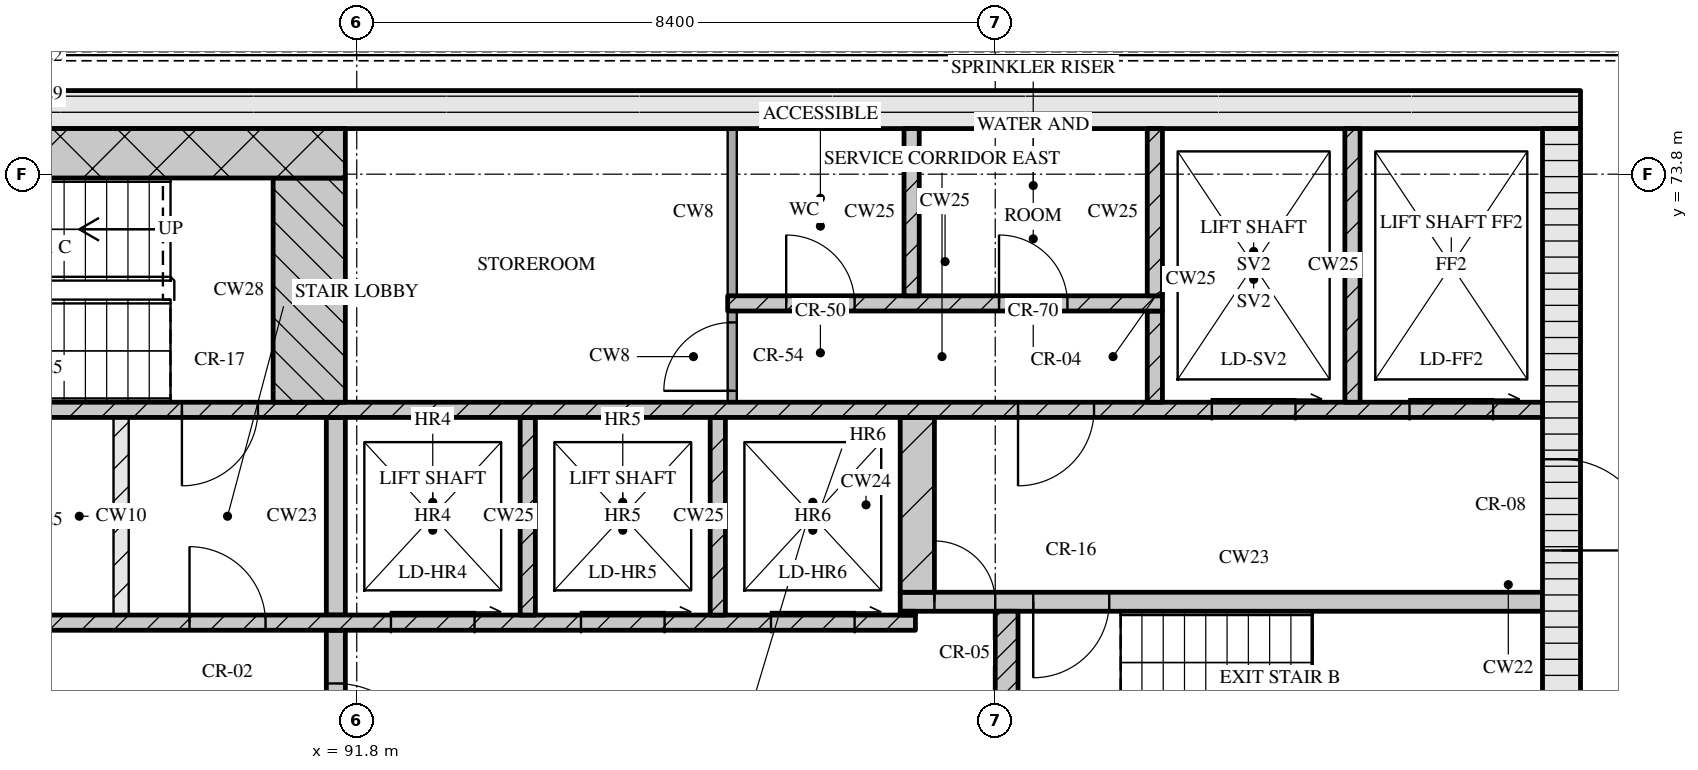
"""IFC4 building model, lengths in metres.
Left out: names, types, materials, properties, quantities, classifications, styles, units other than length and angle.
Written with IfcOpenShell. Run it as: python <this file> out.ifc"""

import sys

from ifc_helpers import new_model, si_unit, direction, frame, frame_2d, origin, place, context, subcontext, project, spatial, rectangle, extrude, element, fill, save


model = new_model("IFC4")
c1 = context("Model", 3, precision=1e-05, world=origin(), true_north=direction((0.0, 1.0)))
c2 = subcontext(c1, "Body", "Model", "MODEL_VIEW")
j1 = project(units=[si_unit("LENGTHUNIT", "METRE"), si_unit("PLANEANGLEUNIT", "RADIAN")], contexts=[c1])
p1 = place(None, origin())
s1 = spatial("IfcSite", under=j1, at=p1, CompositionType="ELEMENT")
p2 = place(p1, origin())
s2 = spatial("IfcBuilding", under=s1, at=p2, CompositionType="ELEMENT")
p3 = place(p2, frame((0.0, 0.0, 292.35)))
s3 = spatial("IfcBuildingStorey", under=s2, at=p3, CompositionType="ELEMENT", Elevation=292.35)
p4 = place(p3, frame((67.3, 74.65, 0.0), z_axis=(0.0, 0.0, 1.0), x_axis=(1.0, 0.0, 0.0)))
e1 = element("IfcWall", 1, at=p4, inside=s3, PredefinedType="SOLIDWALL", context=c2, shape_type="SweptSolid", body=[
    extrude(rectangle(XDim=40.6, YDim=0.5, at=frame_2d((20.3, 0.0))), origin(), (0.0, 0.0, 1.0), 3.32),
])
p5 = place(p3, frame((107.65, 62.4, 0.0), z_axis=(0.0, 0.0, 1.0), x_axis=(0.0, 1.0, 0.0)))
e2 = element("IfcWall", 2, at=p5, inside=s3, PredefinedType="SOLIDWALL", context=c2, shape_type="SweptSolid", body=[
    extrude(rectangle(XDim=12.0, YDim=0.5, at=frame_2d((6.0, 0.0))), origin(), (0.0, 0.0, 1.0), 3.32),
])
p6 = place(p5, frame((6.45, 0.0, 0.0)))
e3 = element("IfcOpeningElement", 3, at=p6, cuts=e2, PredefinedType="OPENING", context=c2, shape_type="SweptSolid", body=[
    extrude(rectangle(XDim=1.2, YDim=2.1, at=frame_2d((0.6, 1.05))), frame((0.0, 0.26, 0.0), z_axis=(0.0, -1.0, 0.0), x_axis=(1.0, 0.0, 0.0)), (0.0, 0.0, 1.0), 0.52),
])
p7 = place(p3, frame((91.525, 65.2, 0.0), z_axis=(0.0, 0.0, 1.0), x_axis=(0.0, 1.0, 0.0)))
e4 = element("IfcWall", 4, at=p7, inside=s3, PredefinedType="SOLIDWALL", context=c2, shape_type="SweptSolid", body=[
    extrude(rectangle(XDim=2.6, YDim=0.25, at=frame_2d((1.3, 0.0))), origin(), (0.0, 0.0, 1.0), 3.32),
])
p8 = place(p7, frame((0.7, 0.0, 0.0)))
e5 = element("IfcOpeningElement", 5, at=p8, cuts=e4, PredefinedType="OPENING", context=c2, shape_type="SweptSolid", body=[
    extrude(rectangle(XDim=1.2, YDim=2.1, at=frame_2d((0.6, 1.05))), frame((0.0, 0.135, 0.0), z_axis=(0.0, -1.0, 0.0), x_axis=(1.0, 0.0, 0.0)), (0.0, 0.0, 1.0), 0.27),
])
p9 = place(p3, frame((100.35, 65.2, 0.0), z_axis=(0.0, 0.0, 1.0), x_axis=(0.0, 1.0, 0.0)))
e6 = element("IfcWall", 6, at=p9, inside=s3, PredefinedType="SOLIDWALL", context=c2, shape_type="SweptSolid", body=[
    extrude(rectangle(XDim=2.85, YDim=0.3, at=frame_2d((1.425, 0.0))), origin(), (0.0, 0.0, 1.0), 3.32),
])
p10 = place(p3, frame((76.05, 67.9, 0.0), z_axis=(0.0, 0.0, 1.0), x_axis=(1.0, 0.0, 0.0)))
e7 = element("IfcWall", 7, at=p10, inside=s3, PredefinedType="SOLIDWALL", context=c2, shape_type="SweptSolid", body=[
    extrude(rectangle(XDim=23.1, YDim=0.2, at=frame_2d((11.55, 0.0))), origin(), (0.0, 0.0, 1.0), 3.32),
])
p11 = place(p10, frame((1.95, 0.0, 0.0)))
e8 = element("IfcOpeningElement", 8, at=p11, cuts=e7, PredefinedType="OPENING", context=c2, shape_type="SweptSolid", body=[
    extrude(rectangle(XDim=0.9, YDim=2.1, at=frame_2d((0.45, 1.05))), frame((0.0, 0.11, 0.0), z_axis=(0.0, -1.0, 0.0), x_axis=(1.0, 0.0, 0.0)), (0.0, 0.0, 1.0), 0.22),
])
p12 = place(p10, frame((5.66, 0.0, 0.0)))
e9 = element("IfcOpeningElement", 9, at=p12, cuts=e7, PredefinedType="OPENING", context=c2, shape_type="SweptSolid", body=[
    extrude(rectangle(XDim=0.9, YDim=2.1, at=frame_2d((0.45, 1.05))), frame((0.0, 0.11, 0.0), z_axis=(0.0, -1.0, 0.0), x_axis=(1.0, 0.0, 0.0)), (0.0, 0.0, 1.0), 0.22),
])
p13 = place(p10, frame((9.7, 0.0, 0.0)))
e10 = element("IfcOpeningElement", 10, at=p13, cuts=e7, PredefinedType="OPENING", context=c2, shape_type="SweptSolid", body=[
    extrude(rectangle(XDim=0.9, YDim=2.1, at=frame_2d((0.45, 1.05))), frame((0.0, 0.11, 0.0), z_axis=(0.0, -1.0, 0.0), x_axis=(1.0, 0.0, 0.0)), (0.0, 0.0, 1.0), 0.22),
])
p14 = place(p10, frame((13.55, 0.0, 0.0)))
e11 = element("IfcOpeningElement", 11, at=p14, cuts=e7, PredefinedType="OPENING", context=c2, shape_type="SweptSolid", body=[
    extrude(rectangle(XDim=1.0, YDim=2.1, at=frame_2d((0.5, 1.05))), frame((0.0, 0.11, 0.0), z_axis=(0.0, -1.0, 0.0), x_axis=(1.0, 0.0, 0.0)), (0.0, 0.0, 1.0), 0.22),
])
p15 = place(p10, frame((16.2, 0.0, 0.0)))
e12 = element("IfcOpeningElement", 12, at=p15, cuts=e7, PredefinedType="OPENING", context=c2, shape_type="SweptSolid", body=[
    extrude(rectangle(XDim=1.1, YDim=2.1, at=frame_2d((0.55, 1.05))), frame((0.0, 0.11, 0.0), z_axis=(0.0, -1.0, 0.0), x_axis=(1.0, 0.0, 0.0)), (0.0, 0.0, 1.0), 0.22),
])
p16 = place(p10, frame((18.7, 0.0, 0.0)))
e13 = element("IfcOpeningElement", 13, at=p16, cuts=e7, PredefinedType="OPENING", context=c2, shape_type="SweptSolid", body=[
    extrude(rectangle(XDim=1.1, YDim=2.1, at=frame_2d((0.55, 1.05))), frame((0.0, 0.11, 0.0), z_axis=(0.0, -1.0, 0.0), x_axis=(1.0, 0.0, 0.0)), (0.0, 0.0, 1.0), 0.22),
])
p17 = place(p10, frame((21.2, 0.0, 0.0)))
e14 = element("IfcOpeningElement", 14, at=p17, cuts=e7, PredefinedType="OPENING", context=c2, shape_type="SweptSolid", body=[
    extrude(rectangle(XDim=1.1, YDim=2.1, at=frame_2d((0.55, 1.05))), frame((0.0, 0.11, 0.0), z_axis=(0.0, -1.0, 0.0), x_axis=(1.0, 0.0, 0.0)), (0.0, 0.0, 1.0), 0.22),
])
p18 = place(p3, frame((88.7, 68.0, 0.0), z_axis=(0.0, 0.0, 1.0), x_axis=(0.0, 1.0, 0.0)))
e15 = element("IfcWall", 15, at=p18, inside=s3, PredefinedType="PARTITIONING", context=c2, shape_type="SweptSolid", body=[
    extrude(rectangle(XDim=2.6, YDim=0.2, at=frame_2d((1.3, 0.0))), origin(), (0.0, 0.0, 1.0), 3.32),
])
p19 = place(p3, frame((91.525, 68.0, 0.0), z_axis=(0.0, 0.0, 1.0), x_axis=(0.0, 1.0, 0.0)))
e16 = element("IfcWall", 16, at=p19, inside=s3, PredefinedType="SOLIDWALL", context=c2, shape_type="SweptSolid", body=[
    extrude(rectangle(XDim=2.6, YDim=0.25, at=frame_2d((1.3, 0.0))), origin(), (0.0, 0.0, 1.0), 3.32),
])
for number, where, z_axis, x_axis in (
    (17, (94.05, 68.0, 0.0), (0.0, 0.0, 1.0), (0.0, 1.0, 0.0)),
    (18, (96.55, 68.0, 0.0), (0.0, 0.0, 1.0), (0.0, 1.0, 0.0)),
):
    element("IfcWall", number, at=place(p3, frame(where, z_axis=z_axis, x_axis=x_axis)), inside=s3, PredefinedType="SOLIDWALL", context=c2, shape_type="SweptSolid", body=[
        extrude(rectangle(XDim=2.6, YDim=0.2, at=frame_2d((1.3, 0.0))), origin(), (0.0, 0.0, 1.0), 3.32),
    ])
p20 = place(p3, frame((98.95, 68.025, 0.0), z_axis=(0.0, 0.0, 1.0), x_axis=(1.0, 0.0, 0.0)))
e19 = element("IfcWall", 19, at=p20, inside=s3, PredefinedType="SOLIDWALL", context=c2, shape_type="SweptSolid", body=[
    extrude(rectangle(XDim=0.2, YDim=0.05, at=frame_2d((0.1, 0.0))), origin(), (0.0, 0.0, 1.0), 3.32),
])
p21 = place(p3, frame((98.95, 68.175, 0.0), z_axis=(0.0, 0.0, 1.0), x_axis=(1.0, 0.0, 0.0)))
e20 = element("IfcWall", 20, at=p21, inside=s3, PredefinedType="SOLIDWALL", context=c2, shape_type="SweptSolid", body=[
    extrude(rectangle(XDim=8.45, YDim=0.25, at=frame_2d((4.225, 0.0))), origin(), (0.0, 0.0, 1.0), 3.32),
])
p22 = place(p21, frame((0.45, 0.0, 0.0)))
e21 = element("IfcOpeningElement", 21, at=p22, cuts=e20, PredefinedType="OPENING", context=c2, shape_type="SweptSolid", body=[
    extrude(rectangle(XDim=0.8, YDim=2.1, at=frame_2d((0.4, 1.05))), frame((0.0, 0.135, 0.0), z_axis=(0.0, -1.0, 0.0), x_axis=(1.0, 0.0, 0.0)), (0.0, 0.0, 1.0), 0.27),
])
p23 = place(p21, frame((1.75, 0.0, 0.0)))
e22 = element("IfcOpeningElement", 22, at=p23, cuts=e20, PredefinedType="OPENING", context=c2, shape_type="SweptSolid", body=[
    extrude(rectangle(XDim=1.0, YDim=2.1, at=frame_2d((0.5, 1.05))), frame((0.0, 0.135, 0.0), z_axis=(0.0, -1.0, 0.0), x_axis=(1.0, 0.0, 0.0)), (0.0, 0.0, 1.0), 0.27),
])
p24 = place(p3, frame((99.175, 68.3, 0.0), z_axis=(0.0, 0.0, 1.0), x_axis=(0.0, 1.0, 0.0)))
e23 = element("IfcWall", 23, at=p24, inside=s3, PredefinedType="SOLIDWALL", context=c2, shape_type="SweptSolid", body=[
    extrude(rectangle(XDim=2.3, YDim=0.45, at=frame_2d((1.15, 0.0))), origin(), (0.0, 0.0, 1.0), 3.32),
])
p25 = place(p3, frame((67.8, 70.7, 0.0), z_axis=(0.0, 0.0, 1.0), x_axis=(1.0, 0.0, 0.0)))
e24 = element("IfcWall", 24, at=p25, inside=s3, PredefinedType="SOLIDWALL", context=c2, shape_type="SweptSolid", body=[
    extrude(rectangle(XDim=39.6, YDim=0.2, at=frame_2d((19.8, 0.0))), origin(), (0.0, 0.0, 1.0), 3.32),
])
p26 = place(p25, frame((0.65, 0.0, 0.0)))
e25 = element("IfcOpeningElement", 25, at=p26, cuts=e24, PredefinedType="OPENING", context=c2, shape_type="SweptSolid", body=[
    extrude(rectangle(XDim=1.1, YDim=2.1, at=frame_2d((0.55, 1.05))), frame((0.0, 0.11, 0.0), z_axis=(0.0, -1.0, 0.0), x_axis=(1.0, 0.0, 0.0)), (0.0, 0.0, 1.0), 0.22),
])
p27 = place(p25, frame((3.25, 0.0, 0.0)))
e26 = element("IfcOpeningElement", 26, at=p27, cuts=e24, PredefinedType="OPENING", context=c2, shape_type="SweptSolid", body=[
    extrude(rectangle(XDim=1.1, YDim=2.1, at=frame_2d((0.55, 1.05))), frame((0.0, 0.11, 0.0), z_axis=(0.0, -1.0, 0.0), x_axis=(1.0, 0.0, 0.0)), (0.0, 0.0, 1.0), 0.22),
])
p28 = place(p25, frame((5.9, 0.0, 0.0)))
e27 = element("IfcOpeningElement", 27, at=p28, cuts=e24, PredefinedType="OPENING", context=c2, shape_type="SweptSolid", body=[
    extrude(rectangle(XDim=1.0, YDim=2.1, at=frame_2d((0.5, 1.05))), frame((0.0, 0.11, 0.0), z_axis=(0.0, -1.0, 0.0), x_axis=(1.0, 0.0, 0.0)), (0.0, 0.0, 1.0), 0.22),
])
p29 = place(p25, frame((21.7, 0.0, 0.0)))
e28 = element("IfcOpeningElement", 28, at=p29, cuts=e24, PredefinedType="OPENING", context=c2, shape_type="SweptSolid", body=[
    extrude(rectangle(XDim=1.0, YDim=2.1, at=frame_2d((0.5, 1.05))), frame((0.0, 0.11, 0.0), z_axis=(0.0, -1.0, 0.0), x_axis=(1.0, 0.0, 0.0)), (0.0, 0.0, 1.0), 0.22),
])
p30 = place(p25, frame((32.7, 0.0, 0.0)))
e29 = element("IfcOpeningElement", 29, at=p30, cuts=e24, PredefinedType="OPENING", context=c2, shape_type="SweptSolid", body=[
    extrude(rectangle(XDim=1.0, YDim=2.1, at=frame_2d((0.5, 1.05))), frame((0.0, 0.11, 0.0), z_axis=(0.0, -1.0, 0.0), x_axis=(1.0, 0.0, 0.0)), (0.0, 0.0, 1.0), 0.22),
])
p31 = place(p25, frame((35.25, 0.0, 0.0)))
e30 = element("IfcOpeningElement", 30, at=p31, cuts=e24, PredefinedType="OPENING", context=c2, shape_type="SweptSolid", body=[
    extrude(rectangle(XDim=1.1, YDim=2.1, at=frame_2d((0.55, 1.05))), frame((0.0, 0.11, 0.0), z_axis=(0.0, -1.0, 0.0), x_axis=(1.0, 0.0, 0.0)), (0.0, 0.0, 1.0), 0.22),
])
p32 = place(p25, frame((37.85, 0.0, 0.0)))
e31 = element("IfcOpeningElement", 31, at=p32, cuts=e24, PredefinedType="OPENING", context=c2, shape_type="SweptSolid", body=[
    extrude(rectangle(XDim=1.1, YDim=2.1, at=frame_2d((0.55, 1.05))), frame((0.0, 0.11, 0.0), z_axis=(0.0, -1.0, 0.0), x_axis=(1.0, 0.0, 0.0)), (0.0, 0.0, 1.0), 0.22),
])
p33 = place(p3, frame((91.175, 70.8, 0.0), z_axis=(0.0, 0.0, 1.0), x_axis=(0.0, 1.0, 0.0)))
e32 = element("IfcWall", 32, at=p33, inside=s3, PredefinedType="SOLIDWALL", context=c2, shape_type="SweptSolid", body=[
    extrude(rectangle(XDim=2.95, YDim=0.95, at=frame_2d((1.475, 0.0))), origin(), (0.0, 0.0, 1.0), 3.32),
])
p34 = place(p3, frame((96.74, 70.8, 0.0), z_axis=(0.0, 0.0, 1.0), x_axis=(0.0, 1.0, 0.0)))
e33 = element("IfcWall", 33, at=p34, inside=s3, PredefinedType="PARTITIONING", context=c2, shape_type="SweptSolid", body=[
    extrude(rectangle(XDim=1.2, YDim=0.12, at=frame_2d((0.6, 0.0))), origin(), (0.0, 0.0, 1.0), 3.32),
])
p35 = place(p34, frame((0.15, 0.0, 0.0)))
e34 = element("IfcOpeningElement", 34, at=p35, cuts=e33, PredefinedType="OPENING", context=c2, shape_type="SweptSolid", body=[
    extrude(rectangle(XDim=0.9, YDim=2.1, at=frame_2d((0.45, 1.05))), frame((0.0, 0.07, 0.0), z_axis=(0.0, -1.0, 0.0), x_axis=(1.0, 0.0, 0.0)), (0.0, 0.0, 1.0), 0.14),
])
p36 = place(p3, frame((102.3, 70.8, 0.0), z_axis=(0.0, 0.0, 1.0), x_axis=(0.0, 1.0, 0.0)))
e35 = element("IfcWall", 35, at=p36, inside=s3, PredefinedType="SOLIDWALL", context=c2, shape_type="SweptSolid", body=[
    extrude(rectangle(XDim=1.2, YDim=0.2, at=frame_2d((0.6, 0.0))), origin(), (0.0, 0.0, 1.0), 3.32),
])
p37 = place(p3, frame((104.9, 70.8, 0.0), z_axis=(0.0, 0.0, 1.0), x_axis=(0.0, 1.0, 0.0)))
e36 = element("IfcWall", 36, at=p37, inside=s3, PredefinedType="SOLIDWALL", context=c2, shape_type="SweptSolid", body=[
    extrude(rectangle(XDim=3.6, YDim=0.2, at=frame_2d((1.8, 0.0))), origin(), (0.0, 0.0, 1.0), 3.32),
])
p38 = place(p3, frame((96.68, 72.1, 0.0), z_axis=(0.0, 0.0, 1.0), x_axis=(1.0, 0.0, 0.0)))
e37 = element("IfcWall", 37, at=p38, inside=s3, PredefinedType="SOLIDWALL", context=c2, shape_type="SweptSolid", body=[
    extrude(rectangle(XDim=5.72, YDim=0.2, at=frame_2d((2.86, 0.0))), origin(), (0.0, 0.0, 1.0), 3.32),
])
p39 = place(p38, frame((0.77, 0.0, 0.0)))
e38 = element("IfcOpeningElement", 38, at=p39, cuts=e37, PredefinedType="OPENING", context=c2, shape_type="SweptSolid", body=[
    extrude(rectangle(XDim=0.9, YDim=2.1, at=frame_2d((0.45, 1.05))), frame((0.0, 0.11, 0.0), z_axis=(0.0, -1.0, 0.0), x_axis=(1.0, 0.0, 0.0)), (0.0, 0.0, 1.0), 0.22),
])
p40 = place(p38, frame((3.57, 0.0, 0.0)))
e39 = element("IfcOpeningElement", 39, at=p40, cuts=e37, PredefinedType="OPENING", context=c2, shape_type="SweptSolid", body=[
    extrude(rectangle(XDim=0.9, YDim=2.1, at=frame_2d((0.45, 1.05))), frame((0.0, 0.11, 0.0), z_axis=(0.0, -1.0, 0.0), x_axis=(1.0, 0.0, 0.0)), (0.0, 0.0, 1.0), 0.22),
])
p41 = place(p3, frame((96.74, 72.2, 0.0), z_axis=(0.0, 0.0, 1.0), x_axis=(0.0, 1.0, 0.0)))
e40 = element("IfcWall", 40, at=p41, inside=s3, PredefinedType="PARTITIONING", context=c2, shape_type="SweptSolid", body=[
    extrude(rectangle(XDim=2.2, YDim=0.12, at=frame_2d((1.1, 0.0))), origin(), (0.0, 0.0, 1.0), 3.32),
])
for number, where, z_axis, x_axis in (
    (41, (99.1, 72.2, 0.0), (0.0, 0.0, 1.0), (0.0, 1.0, 0.0)),
    (42, (102.3, 72.2, 0.0), (0.0, 0.0, 1.0), (0.0, 1.0, 0.0)),
):
    element("IfcWall", number, at=place(p3, frame(where, z_axis=z_axis, x_axis=x_axis)), inside=s3, PredefinedType="SOLIDWALL", context=c2, shape_type="SweptSolid", body=[
        extrude(rectangle(XDim=2.2, YDim=0.2, at=frame_2d((1.1, 0.0))), origin(), (0.0, 0.0, 1.0), 3.32),
    ])
p42 = place(p3, frame((83.55, 74.075, 0.0), z_axis=(0.0, 0.0, 1.0), x_axis=(1.0, 0.0, 0.0)))
e43 = element("IfcWall", 43, at=p42, inside=s3, PredefinedType="SOLIDWALL", context=c2, shape_type="SweptSolid", body=[
    extrude(rectangle(XDim=8.1, YDim=0.65, at=frame_2d((4.05, 0.0))), origin(), (0.0, 0.0, 1.0), 3.32),
])
p43 = place(p8, origin())
e44 = element("IfcDoor", 44, at=p43, inside=s3, OperationType="SINGLE_SWING_RIGHT", PredefinedType="DOOR", context=c2, shape_type="SweptSolid", body=[
    extrude(rectangle(XDim=1.2, YDim=2.1, at=frame_2d((0.6, 1.05))), frame((0.0, 0.025, 0.0), z_axis=(0.0, -1.0, 0.0), x_axis=(1.0, 0.0, 0.0)), (0.0, 0.0, 1.0), 0.05),
])
fill(e5, e44)
p44 = place(p14, origin())
e45 = element("IfcDoor", 45, at=p44, inside=s3, OperationType="SINGLE_SWING_LEFT", PredefinedType="DOOR", context=c2, shape_type="SweptSolid", body=[
    extrude(rectangle(XDim=1.0, YDim=2.1, at=frame_2d((0.5, 1.05))), frame((0.0, 0.025, 0.0), z_axis=(0.0, -1.0, 0.0), x_axis=(1.0, 0.0, 0.0)), (0.0, 0.0, 1.0), 0.05),
])
fill(e11, e45)
p45 = place(p15, origin())
e46 = element("IfcDoor", 46, at=p45, inside=s3, OperationType="SLIDING_TO_RIGHT", PredefinedType="DOOR", context=c2, shape_type="SweptSolid", body=[
    extrude(rectangle(XDim=1.1, YDim=2.1, at=frame_2d((0.55, 1.05))), frame((0.0, 0.025, 0.0), z_axis=(0.0, -1.0, 0.0), x_axis=(1.0, 0.0, 0.0)), (0.0, 0.0, 1.0), 0.05),
])
fill(e12, e46)
p46 = place(p16, origin())
e47 = element("IfcDoor", 47, at=p46, inside=s3, OperationType="SLIDING_TO_RIGHT", PredefinedType="DOOR", context=c2, shape_type="SweptSolid", body=[
    extrude(rectangle(XDim=1.1, YDim=2.1, at=frame_2d((0.55, 1.05))), frame((0.0, 0.025, 0.0), z_axis=(0.0, -1.0, 0.0), x_axis=(1.0, 0.0, 0.0)), (0.0, 0.0, 1.0), 0.05),
])
fill(e13, e47)
p47 = place(p17, origin())
e48 = element("IfcDoor", 48, at=p47, inside=s3, OperationType="SLIDING_TO_RIGHT", PredefinedType="DOOR", context=c2, shape_type="SweptSolid", body=[
    extrude(rectangle(XDim=1.1, YDim=2.1, at=frame_2d((0.55, 1.05))), frame((0.0, 0.025, 0.0), z_axis=(0.0, -1.0, 0.0), x_axis=(1.0, 0.0, 0.0)), (0.0, 0.0, 1.0), 0.05),
])
fill(e14, e48)
p48 = place(p22, origin())
e49 = element("IfcDoor", 49, at=p48, inside=s3, OperationType="SINGLE_SWING_LEFT", PredefinedType="DOOR", context=c2, shape_type="SweptSolid", body=[
    extrude(rectangle(XDim=0.8, YDim=2.1, at=frame_2d((0.4, 1.05))), frame((0.0, 0.025, 0.0), z_axis=(0.0, -1.0, 0.0), x_axis=(1.0, 0.0, 0.0)), (0.0, 0.0, 1.0), 0.05),
])
fill(e21, e49)
p49 = place(p23, origin())
e50 = element("IfcDoor", 50, at=p49, inside=s3, OperationType="SINGLE_SWING_RIGHT", PredefinedType="DOOR", context=c2, shape_type="SweptSolid", body=[
    extrude(rectangle(XDim=1.0, YDim=2.1, at=frame_2d((0.5, 1.05))), frame((0.0, 0.025, 0.0), z_axis=(0.0, -1.0, 0.0), x_axis=(1.0, 0.0, 0.0)), (0.0, 0.0, 1.0), 0.05),
])
fill(e22, e50)
p50 = place(p6, origin())
e51 = element("IfcDoor", 51, at=p50, inside=s3, OperationType="SINGLE_SWING_RIGHT", PredefinedType="DOOR", context=c2, shape_type="SweptSolid", body=[
    extrude(rectangle(XDim=1.2, YDim=2.1, at=frame_2d((0.6, 1.05))), frame((0.0, 0.025, 0.0), z_axis=(0.0, -1.0, 0.0), x_axis=(1.0, 0.0, 0.0)), (0.0, 0.0, 1.0), 0.05),
])
fill(e3, e51)
p51 = place(p29, origin())
e52 = element("IfcDoor", 52, at=p51, inside=s3, OperationType="SINGLE_SWING_RIGHT", PredefinedType="DOOR", context=c2, shape_type="SweptSolid", body=[
    extrude(rectangle(XDim=1.0, YDim=2.1, at=frame_2d((0.5, 1.05))), frame((0.0, 0.025, 0.0), z_axis=(0.0, -1.0, 0.0), x_axis=(1.0, 0.0, 0.0)), (0.0, 0.0, 1.0), 0.05),
])
fill(e28, e52)
p52 = place(p30, origin())
e53 = element("IfcDoor", 53, at=p52, inside=s3, OperationType="SINGLE_SWING_RIGHT", PredefinedType="DOOR", context=c2, shape_type="SweptSolid", body=[
    extrude(rectangle(XDim=1.0, YDim=2.1, at=frame_2d((0.5, 1.05))), frame((0.0, 0.025, 0.0), z_axis=(0.0, -1.0, 0.0), x_axis=(1.0, 0.0, 0.0)), (0.0, 0.0, 1.0), 0.05),
])
fill(e29, e53)
p53 = place(p31, origin())
e54 = element("IfcDoor", 54, at=p53, inside=s3, OperationType="SLIDING_TO_RIGHT", PredefinedType="DOOR", context=c2, shape_type="SweptSolid", body=[
    extrude(rectangle(XDim=1.1, YDim=2.1, at=frame_2d((0.55, 1.05))), frame((0.0, 0.025, 0.0), z_axis=(0.0, -1.0, 0.0), x_axis=(1.0, 0.0, 0.0)), (0.0, 0.0, 1.0), 0.05),
])
fill(e30, e54)
p54 = place(p32, origin())
e55 = element("IfcDoor", 55, at=p54, inside=s3, OperationType="SLIDING_TO_RIGHT", PredefinedType="DOOR", context=c2, shape_type="SweptSolid", body=[
    extrude(rectangle(XDim=1.1, YDim=2.1, at=frame_2d((0.55, 1.05))), frame((0.0, 0.025, 0.0), z_axis=(0.0, -1.0, 0.0), x_axis=(1.0, 0.0, 0.0)), (0.0, 0.0, 1.0), 0.05),
])
fill(e31, e55)
p55 = place(p35, origin())
e56 = element("IfcDoor", 56, at=p55, inside=s3, OperationType="SINGLE_SWING_LEFT", PredefinedType="DOOR", context=c2, shape_type="SweptSolid", body=[
    extrude(rectangle(XDim=0.9, YDim=2.1, at=frame_2d((0.45, 1.05))), frame((0.0, 0.025, 0.0), z_axis=(0.0, -1.0, 0.0), x_axis=(1.0, 0.0, 0.0)), (0.0, 0.0, 1.0), 0.05),
])
fill(e34, e56)
p56 = place(p39, origin())
e57 = element("IfcDoor", 57, at=p56, inside=s3, OperationType="SINGLE_SWING_LEFT", PredefinedType="DOOR", context=c2, shape_type="SweptSolid", body=[
    extrude(rectangle(XDim=0.9, YDim=2.1, at=frame_2d((0.45, 1.05))), frame((0.0, 0.025, 0.0), z_axis=(0.0, -1.0, 0.0), x_axis=(1.0, 0.0, 0.0)), (0.0, 0.0, 1.0), 0.05),
])
fill(e38, e57)
p57 = place(p40, origin())
e58 = element("IfcDoor", 58, at=p57, inside=s3, OperationType="SINGLE_SWING_LEFT", PredefinedType="DOOR", context=c2, shape_type="SweptSolid", body=[
    extrude(rectangle(XDim=0.9, YDim=2.1, at=frame_2d((0.45, 1.05))), frame((0.0, 0.025, 0.0), z_axis=(0.0, -1.0, 0.0), x_axis=(1.0, 0.0, 0.0)), (0.0, 0.0, 1.0), 0.05),
])
fill(e39, e58)
save(model, sys.argv[1])
